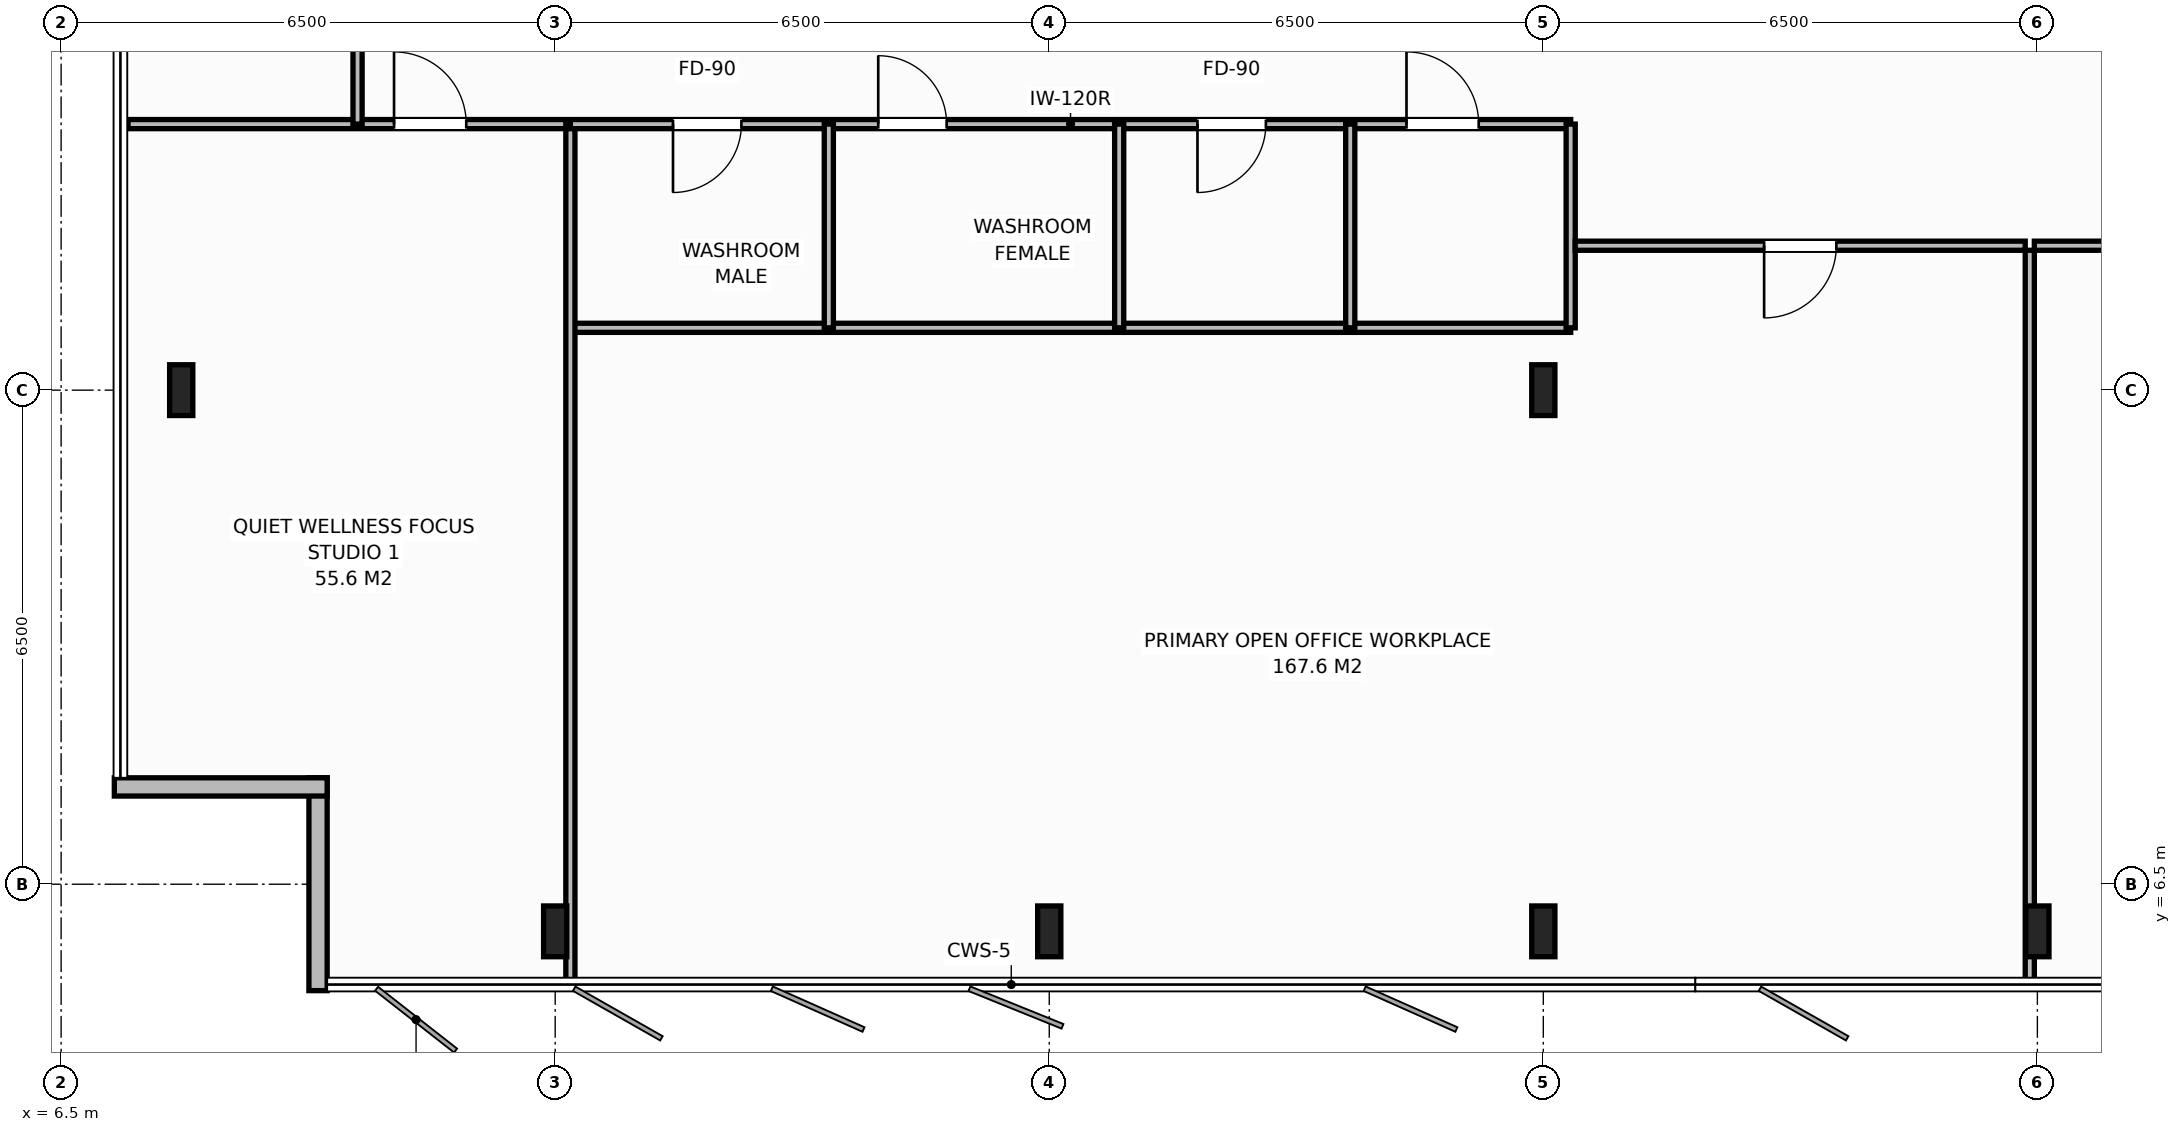
"""IFC4 building model, lengths in metres.
Left out: names, types, materials, properties, quantities, classifications, styles, units other than length and angle.
Written with IfcOpenShell. Run it as: python <this file> out.ifc"""

import sys

from ifc_helpers import new_model, si_unit, direction, frame, frame_2d, origin, origin_2d, place, context, subcontext, project, spatial, rectangle, i_section, extrude, element, fill, save


model = new_model("IFC4")
c1 = context("Model", 3, precision=1e-05, world=origin(), true_north=direction((0.0, 1.0)))
c2 = subcontext(c1, "Body", "Model", "MODEL_VIEW")
j1 = project(units=[si_unit("LENGTHUNIT", "METRE"), si_unit("PLANEANGLEUNIT", "RADIAN")], contexts=[c1])
p1 = place(None, origin())
s1 = spatial("IfcSite", under=j1, at=p1, CompositionType="ELEMENT")
p2 = place(p1, origin())
s2 = spatial("IfcBuilding", under=s1, at=p2, CompositionType="ELEMENT")
p3 = place(p2, frame((0.0, 0.0, 270.8)))
s3 = spatial("IfcBuildingStorey", under=s2, at=p3, CompositionType="ELEMENT", Elevation=270.8)
for number, where, z_axis, x_axis in (
    (1, (26.0, 13.0, 0.0), (0.0, 0.0, 1.0), (1.0, 0.0, 0.0)),
    (2, (13.0, 5.88, 0.0), (0.0, 0.0, 1.0), (1.0, 0.0, 0.0)),
    (3, (19.5, 5.88, 0.0), (0.0, 0.0, 1.0), (1.0, 0.0, 0.0)),
    (4, (26.0, 5.88, 0.0), (0.0, 0.0, 1.0), (1.0, 0.0, 0.0)),
    (5, (32.5, 5.88, 0.0), (0.0, 0.0, 1.0), (1.0, 0.0, 0.0)),
    (6, (8.08, 13.0, 0.0), (0.0, 0.0, 1.0), (1.0, 0.0, 0.0)),
):
    element("IfcColumn", number, at=place(p3, frame(where, z_axis=z_axis, x_axis=x_axis)), inside=s3, PredefinedType="COLUMN", context=c2, shape_type="SweptSolid", body=[
        extrude(i_section(OverallWidth=0.305, OverallDepth=0.668, WebThickness=0.021, FlangeThickness=0.04, at=origin_2d()), origin(), (0.0, 0.0, 1.0), 3.8),
    ])
p4 = place(p3, frame((9.88, 5.1, 0.0), z_axis=(0.0, 0.0, 1.0), x_axis=(0.0, 1.0, 0.0)))
e7 = element("IfcWall", 7, at=p4, inside=s3, PredefinedType="STANDARD", context=c2, shape_type="SweptSolid", body=[
    extrude(rectangle(XDim=2.8, YDim=0.24, at=frame_2d((1.4, 0.0))), origin(), (0.0, 0.0, 1.0), 3.588),
])
p5 = place(p3, frame((10.0, 7.78, 0.0), z_axis=(0.0, 0.0, 1.0), x_axis=(-1.0, 0.0, 0.0)))
e8 = element("IfcWall", 8, at=p5, inside=s3, PredefinedType="STANDARD", context=c2, shape_type="SweptSolid", body=[
    extrude(rectangle(XDim=2.8, YDim=0.24, at=frame_2d((1.4, 0.0))), origin(), (0.0, 0.0, 1.0), 3.588),
])
p6 = place(p3, frame((13.2, 16.5, 0.0), z_axis=(0.0, 0.0, 1.0), x_axis=(1.0, 0.0, 0.0)))
e9 = element("IfcWall", 9, at=p6, inside=s3, PredefinedType="PARTITIONING", context=c2, shape_type="SweptSolid", body=[
    extrude(rectangle(XDim=13.16, YDim=0.12, at=frame_2d((6.58, 0.0))), origin(), (0.0, 0.0, 1.0), 3.588),
])
p7 = place(p6, frame((1.35, 0.0, 0.0)))
e10 = element("IfcOpeningElement", 10, at=p7, cuts=e9, PredefinedType="OPENING", context=c2, shape_type="SweptSolid", body=[
    extrude(rectangle(XDim=0.9, YDim=2.15, at=frame_2d((0.45, 1.075))), frame((0.0, 0.07, 0.0), z_axis=(0.0, -1.0, 0.0), x_axis=(1.0, 0.0, 0.0)), (0.0, 0.0, 1.0), 0.14),
])
p8 = place(p6, frame((4.05, 0.0, 0.0)))
e11 = element("IfcOpeningElement", 11, at=p8, cuts=e9, PredefinedType="OPENING", context=c2, shape_type="SweptSolid", body=[
    extrude(rectangle(XDim=0.9, YDim=2.15, at=frame_2d((0.45, 1.075))), frame((0.0, 0.07, 0.0), z_axis=(0.0, -1.0, 0.0), x_axis=(1.0, 0.0, 0.0)), (0.0, 0.0, 1.0), 0.14),
])
p9 = place(p6, frame((8.25, 0.0, 0.0)))
e12 = element("IfcOpeningElement", 12, at=p9, cuts=e9, PredefinedType="OPENING", context=c2, shape_type="SweptSolid", body=[
    extrude(rectangle(XDim=0.9, YDim=2.15, at=frame_2d((0.45, 1.075))), frame((0.0, 0.07, 0.0), z_axis=(0.0, -1.0, 0.0), x_axis=(1.0, 0.0, 0.0)), (0.0, 0.0, 1.0), 0.14),
])
p10 = place(p6, frame((11.0, 0.0, 0.0)))
e13 = element("IfcOpeningElement", 13, at=p10, cuts=e9, PredefinedType="OPENING", context=c2, shape_type="SweptSolid", body=[
    extrude(rectangle(XDim=0.95, YDim=2.15, at=frame_2d((0.475, 1.075))), frame((0.0, 0.07, 0.0), z_axis=(0.0, -1.0, 0.0), x_axis=(1.0, 0.0, 0.0)), (0.0, 0.0, 1.0), 0.14),
])
p11 = place(p3, frame((13.2, 13.82, 0.0), z_axis=(0.0, 0.0, 1.0), x_axis=(1.0, 0.0, 0.0)))
e14 = element("IfcWall", 14, at=p11, inside=s3, PredefinedType="PARTITIONING", context=c2, shape_type="SweptSolid", body=[
    extrude(rectangle(XDim=13.16, YDim=0.12, at=frame_2d((6.58, 0.0))), origin(), (0.0, 0.0, 1.0), 3.588),
])
for number, where, z_axis, x_axis in (
    (15, (16.6, 13.82, 0.0), (0.0, 0.0, 1.0), (0.0, 1.0, 0.0)),
    (16, (20.42, 13.82, 0.0), (0.0, 0.0, 1.0), (0.0, 1.0, 0.0)),
    (17, (23.46, 13.82, 0.0), (0.0, 0.0, 1.0), (0.0, 1.0, 0.0)),
    (18, (26.36, 13.82, 0.0), (0.0, 0.0, 1.0), (0.0, 1.0, 0.0)),
):
    element("IfcWall", number, at=place(p3, frame(where, z_axis=z_axis, x_axis=x_axis)), inside=s3, PredefinedType="PARTITIONING", context=c2, shape_type="SweptSolid", body=[
        extrude(rectangle(XDim=2.68, YDim=0.12, at=frame_2d((1.34, 0.0))), origin(), (0.0, 0.0, 1.0), 3.588),
    ])
p12 = place(p3, frame((13.2, 5.12, 0.0), z_axis=(0.0, 0.0, 1.0), x_axis=(0.0, 1.0, 0.0)))
e19 = element("IfcWall", 19, at=p12, inside=s3, PredefinedType="PARTITIONING", context=c2, shape_type="SweptSolid", body=[
    extrude(rectangle(XDim=11.32, YDim=0.12, at=frame_2d((5.66, 0.0))), origin(), (0.0, 0.0, 1.0), 2.788),
])
p13 = place(p3, frame((7.38, 16.5, 0.0), z_axis=(0.0, 0.0, 1.0), x_axis=(1.0, 0.0, 0.0)))
e20 = element("IfcWall", 20, at=p13, inside=s3, PredefinedType="PARTITIONING", context=c2, shape_type="SweptSolid", body=[
    extrude(rectangle(XDim=5.76, YDim=0.12, at=frame_2d((2.88, 0.0))), origin(), (0.0, 0.0, 1.0), 3.588),
])
p14 = place(p13, frame((3.5, 0.0, 0.0)))
e21 = element("IfcOpeningElement", 21, at=p14, cuts=e20, PredefinedType="OPENING", context=c2, shape_type="SweptSolid", body=[
    extrude(rectangle(XDim=0.95, YDim=2.15, at=frame_2d((0.475, 1.075))), frame((0.0, 0.07, 0.0), z_axis=(0.0, -1.0, 0.0), x_axis=(1.0, 0.0, 0.0)), (0.0, 0.0, 1.0), 0.14),
])
p15 = place(p3, frame((32.4, 5.12, 0.0), z_axis=(0.0, 0.0, 1.0), x_axis=(0.0, 1.0, 0.0)))
e22 = element("IfcWall", 22, at=p15, inside=s3, PredefinedType="PARTITIONING", context=c2, shape_type="SweptSolid", body=[
    extrude(rectangle(XDim=9.72, YDim=0.12, at=frame_2d((4.86, 0.0))), origin(), (0.0, 0.0, 1.0), 2.788),
])
p16 = place(p3, frame((26.42, 14.9, 0.0), z_axis=(0.0, 0.0, 1.0), x_axis=(1.0, 0.0, 0.0)))
e23 = element("IfcWall", 23, at=p16, inside=s3, PredefinedType="PARTITIONING", context=c2, shape_type="SweptSolid", body=[
    extrude(rectangle(XDim=5.92, YDim=0.12, at=frame_2d((2.96, 0.0))), origin(), (0.0, 0.0, 1.0), 3.588),
])
p17 = place(p16, frame((2.485, 0.0, 0.0)))
e24 = element("IfcOpeningElement", 24, at=p17, cuts=e23, PredefinedType="OPENING", context=c2, shape_type="SweptSolid", body=[
    extrude(rectangle(XDim=0.95, YDim=2.15, at=frame_2d((0.475, 1.075))), frame((0.0, 0.07, 0.0), z_axis=(0.0, -1.0, 0.0), x_axis=(1.0, 0.0, 0.0)), (0.0, 0.0, 1.0), 0.14),
])
p18 = place(p3, frame((32.46, 14.9, 0.0), z_axis=(0.0, 0.0, 1.0), x_axis=(1.0, 0.0, 0.0)))
e25 = element("IfcWall", 25, at=p18, inside=s3, PredefinedType="PARTITIONING", context=c2, shape_type="SweptSolid", body=[
    extrude(rectangle(XDim=3.472, YDim=0.12, at=frame_2d((1.736, 0.0))), origin(), (0.0, 0.0, 1.0), 3.588),
])
p19 = place(p18, frame((1.261, 0.0, 0.0)))
e26 = element("IfcOpeningElement", 26, at=p19, cuts=e25, PredefinedType="OPENING", context=c2, shape_type="SweptSolid", body=[
    extrude(rectangle(XDim=0.95, YDim=2.15, at=frame_2d((0.475, 1.075))), frame((0.0, 0.07, 0.0), z_axis=(0.0, -1.0, 0.0), x_axis=(1.0, 0.0, 0.0)), (0.0, 0.0, 1.0), 0.14),
])
p20 = place(p3, frame((10.4, 16.5, 0.0), z_axis=(0.0, 0.0, 1.0), x_axis=(0.0, 1.0, 0.0)))
e27 = element("IfcWall", 27, at=p20, inside=s3, PredefinedType="PARTITIONING", context=c2, shape_type="SweptSolid", body=[
    extrude(rectangle(XDim=19.0, YDim=0.12, at=frame_2d((9.5, 0.0))), origin(), (0.0, 0.0, 1.0), 3.588),
])
p21 = place(p20, frame((9.025, 0.0, 0.0)))
e28 = element("IfcOpeningElement", 28, at=p21, cuts=e27, PredefinedType="OPENING", context=c2, shape_type="SweptSolid", body=[
    extrude(rectangle(XDim=0.95, YDim=2.15, at=frame_2d((0.475, 1.075))), frame((0.0, 0.07, 0.0), z_axis=(0.0, -1.0, 0.0), x_axis=(1.0, 0.0, 0.0)), (0.0, 0.0, 1.0), 0.14),
])
p22 = place(p7, origin())
e29 = element("IfcDoor", 29, at=p22, inside=s3, OperationType="SINGLE_SWING_RIGHT", PredefinedType="DOOR", context=c2, shape_type="SweptSolid", body=[
    extrude(rectangle(XDim=0.9, YDim=2.15, at=frame_2d((0.45, 1.075))), frame((0.0, 0.025, 0.0), z_axis=(0.0, -1.0, 0.0), x_axis=(1.0, 0.0, 0.0)), (0.0, 0.0, 1.0), 0.05),
])
fill(e10, e29)
p23 = place(p8, origin())
e30 = element("IfcDoor", 30, at=p23, inside=s3, OperationType="SINGLE_SWING_LEFT", PredefinedType="DOOR", context=c2, shape_type="SweptSolid", body=[
    extrude(rectangle(XDim=0.9, YDim=2.15, at=frame_2d((0.45, 1.075))), frame((0.0, 0.025, 0.0), z_axis=(0.0, -1.0, 0.0), x_axis=(1.0, 0.0, 0.0)), (0.0, 0.0, 1.0), 0.05),
])
fill(e11, e30)
p24 = place(p9, origin())
e31 = element("IfcDoor", 31, at=p24, inside=s3, OperationType="SINGLE_SWING_RIGHT", PredefinedType="DOOR", context=c2, shape_type="SweptSolid", body=[
    extrude(rectangle(XDim=0.9, YDim=2.15, at=frame_2d((0.45, 1.075))), frame((0.0, 0.025, 0.0), z_axis=(0.0, -1.0, 0.0), x_axis=(1.0, 0.0, 0.0)), (0.0, 0.0, 1.0), 0.05),
])
fill(e12, e31)
p25 = place(p10, origin())
e32 = element("IfcDoor", 32, at=p25, inside=s3, OperationType="SINGLE_SWING_LEFT", PredefinedType="DOOR", context=c2, shape_type="SweptSolid", body=[
    extrude(rectangle(XDim=0.95, YDim=2.15, at=frame_2d((0.475, 1.075))), frame((0.0, 0.025, 0.0), z_axis=(0.0, -1.0, 0.0), x_axis=(1.0, 0.0, 0.0)), (0.0, 0.0, 1.0), 0.05),
])
fill(e13, e32)
p26 = place(p14, origin())
e33 = element("IfcDoor", 33, at=p26, inside=s3, OperationType="SINGLE_SWING_LEFT", PredefinedType="DOOR", context=c2, shape_type="SweptSolid", body=[
    extrude(rectangle(XDim=0.95, YDim=2.15, at=frame_2d((0.475, 1.075))), frame((0.0, 0.025, 0.0), z_axis=(0.0, -1.0, 0.0), x_axis=(1.0, 0.0, 0.0)), (0.0, 0.0, 1.0), 0.05),
])
fill(e21, e33)
p27 = place(p17, origin())
e34 = element("IfcDoor", 34, at=p27, inside=s3, OperationType="SINGLE_SWING_RIGHT", PredefinedType="DOOR", context=c2, shape_type="SweptSolid", body=[
    extrude(rectangle(XDim=0.95, YDim=2.15, at=frame_2d((0.475, 1.075))), frame((0.0, 0.025, 0.0), z_axis=(0.0, -1.0, 0.0), x_axis=(1.0, 0.0, 0.0)), (0.0, 0.0, 1.0), 0.05),
])
fill(e24, e34)
save(model, sys.argv[1])
